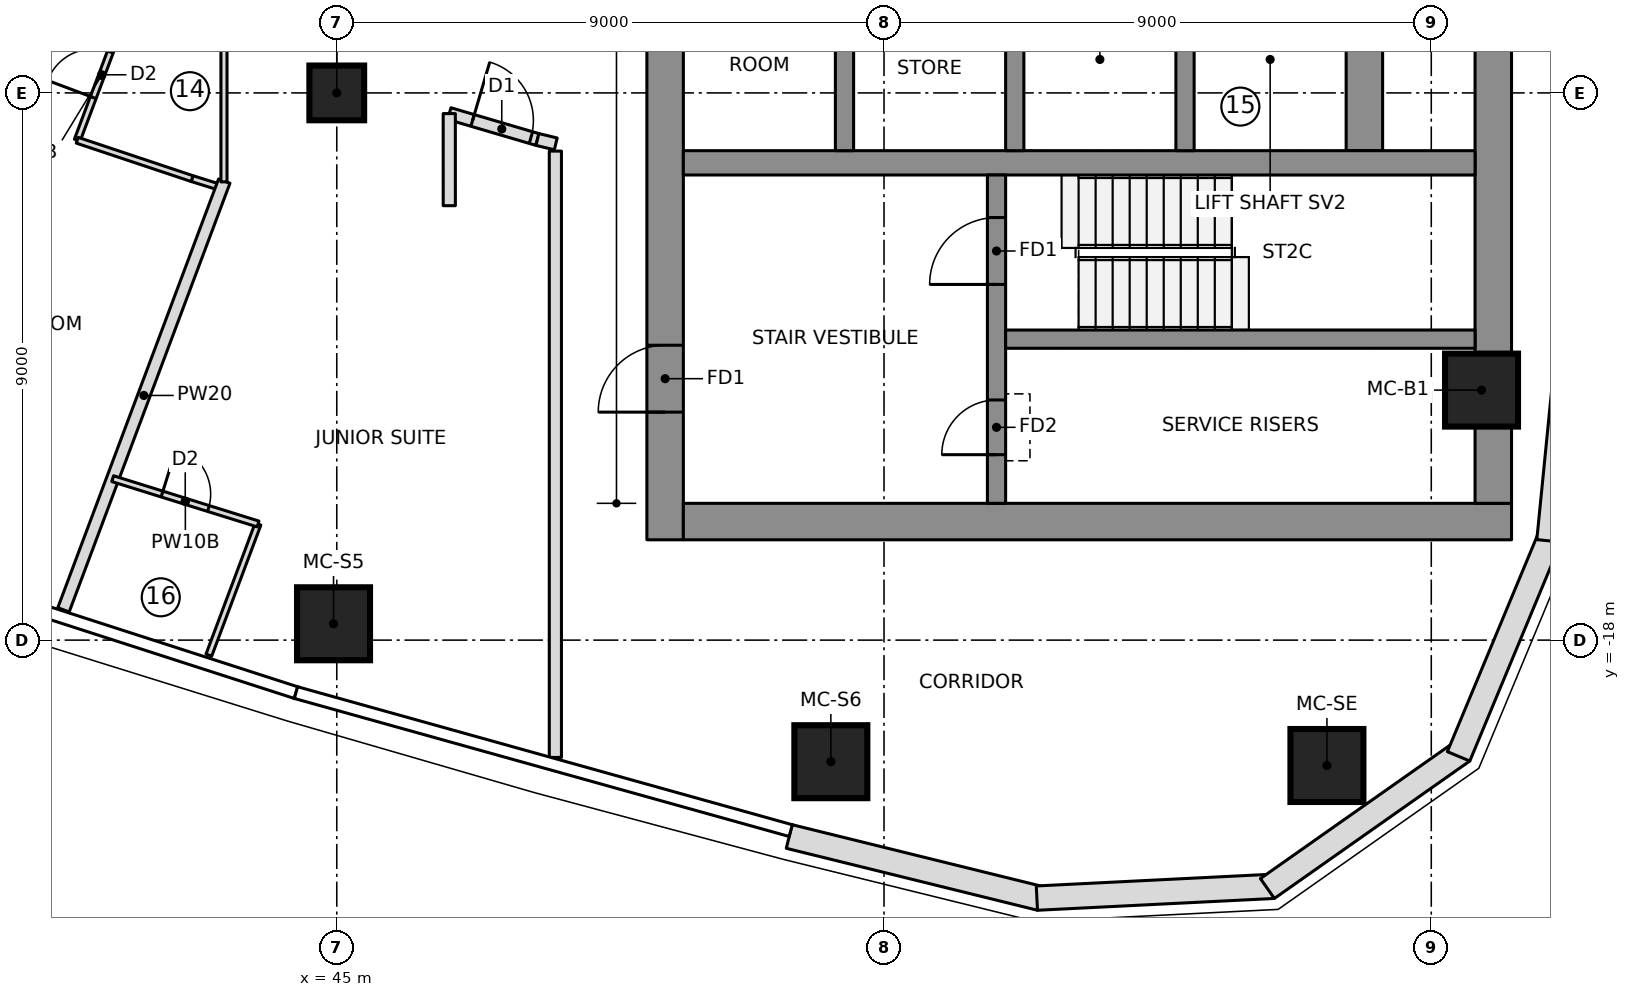
"""IFC4 building model, lengths in metres.
Left out: names, types, materials, properties, quantities, classifications, styles, units other than length and angle.
Written with IfcOpenShell. Run it as: python <this file> out.ifc"""

import sys

from ifc_helpers import new_model, si_unit, direction, frame, frame_2d, origin, origin_2d, place, context, subcontext, project, spatial, polyline, rectangle, outline, extrude, element, fill, save


model = new_model("IFC4")
c1 = context("Model", 3, precision=1e-05, world=origin(), true_north=direction((0.0, 1.0)))
c2 = subcontext(c1, "Body", "Model", "MODEL_VIEW")
j1 = project(units=[si_unit("LENGTHUNIT", "METRE"), si_unit("PLANEANGLEUNIT", "RADIAN")], contexts=[c1])
p1 = place(None, origin())
s1 = spatial("IfcSite", under=j1, at=p1, CompositionType="ELEMENT")
p2 = place(p1, origin())
s2 = spatial("IfcBuilding", under=s1, at=p2, CompositionType="ELEMENT")
p3 = place(p2, frame((0.0, 0.0, 220.8)))
s3 = spatial("IfcBuildingStorey", under=s2, at=p3, CompositionType="ELEMENT", Elevation=220.8)
p4 = place(p3, frame((50.4, -16.35, 0.0), z_axis=(0.0, 0.0, 1.0), x_axis=(0.0, 1.0, 0.0)))
e1 = element("IfcWall", 1, at=p4, inside=s3, PredefinedType="SHEAR", context=c2, shape_type="SweptSolid", body=[
    extrude(rectangle(XDim=9.7, YDim=0.6, at=frame_2d((4.85, 0.0))), origin(), (0.0, 0.0, 1.0), 3.55),
])
p5 = place(p4, frame((2.1, 0.0, 0.0)))
e2 = element("IfcOpeningElement", 2, at=p5, cuts=e1, PredefinedType="OPENING", context=c2, shape_type="SweptSolid", body=[
    extrude(rectangle(XDim=1.1, YDim=2.1, at=frame_2d((0.55, 1.05))), frame((0.0, 0.31, 0.0), z_axis=(0.0, -1.0, 0.0), x_axis=(1.0, 0.0, 0.0)), (0.0, 0.0, 1.0), 0.62),
])
p6 = place(p3, frame((50.7, -16.05, 0.0), z_axis=(0.0, 0.0, 1.0), x_axis=(1.0, 0.0, 0.0)))
e3 = element("IfcWall", 3, at=p6, inside=s3, PredefinedType="SHEAR", context=c2, shape_type="SweptSolid", body=[
    extrude(rectangle(XDim=13.62, YDim=0.6, at=frame_2d((6.81, 0.0))), origin(), (0.0, 0.0, 1.0), 3.55),
])
p7 = place(p3, frame((64.02, -15.75, 0.0), z_axis=(0.0, 0.0, 1.0), x_axis=(0.0, 1.0, 0.0)))
e4 = element("IfcWall", 4, at=p7, inside=s3, PredefinedType="SHEAR", context=c2, shape_type="SweptSolid", body=[
    extrude(rectangle(XDim=8.248, YDim=0.6, at=frame_2d((4.124, 0.0))), origin(), (0.0, 0.0, 1.0), 3.55),
])
p8 = place(p3, frame((61.9, -9.95, 0.0), z_axis=(0.0, 0.0, 1.0), x_axis=(0.0, 1.0, 0.0)))
e5 = element("IfcWall", 5, at=p8, inside=s3, PredefinedType="SHEAR", context=c2, shape_type="SweptSolid", body=[
    extrude(rectangle(XDim=19.9, YDim=0.6, at=frame_2d((9.95, 0.0))), origin(), (0.0, 0.0, 1.0), 3.55),
])
p9 = place(p3, frame((50.7, -10.15, 0.0), z_axis=(0.0, 0.0, 1.0), x_axis=(1.0, 0.0, 0.0)))
e6 = element("IfcWall", 6, at=p9, inside=s3, PredefinedType="SHEAR", context=c2, shape_type="SweptSolid", body=[
    extrude(rectangle(XDim=13.02, YDim=0.4, at=frame_2d((6.51, 0.0))), origin(), (0.0, 0.0, 1.0), 3.55),
])
for number, where, z_axis, x_axis in (
    (7, (53.35, -9.95, 0.0), (0.0, 0.0, 1.0), (0.0, 1.0, 0.0)),
    (8, (56.15, -9.95, 0.0), (0.0, 0.0, 1.0), (0.0, 1.0, 0.0)),
    (9, (58.95, -9.95, 0.0), (0.0, 0.0, 1.0), (0.0, 1.0, 0.0)),
):
    element("IfcWall", number, at=place(p3, frame(where, z_axis=z_axis, x_axis=x_axis)), inside=s3, PredefinedType="SHEAR", context=c2, shape_type="SweptSolid", body=[
        extrude(rectangle(XDim=3.0, YDim=0.3, at=frame_2d((1.5, 0.0))), origin(), (0.0, 0.0, 1.0), 3.55),
    ])
p10 = place(p3, frame((55.85, -15.75, 0.0), z_axis=(0.0, 0.0, 1.0), x_axis=(0.0, 1.0, 0.0)))
e10 = element("IfcWall", 10, at=p10, inside=s3, PredefinedType="SHEAR", context=c2, shape_type="SweptSolid", body=[
    extrude(rectangle(XDim=5.4, YDim=0.3, at=frame_2d((2.7, 0.0))), origin(), (0.0, 0.0, 1.0), 3.55),
])
p11 = place(p10, frame((3.6, 0.0, 0.0)))
e11 = element("IfcOpeningElement", 11, at=p11, cuts=e10, PredefinedType="OPENING", context=c2, shape_type="SweptSolid", body=[
    extrude(rectangle(XDim=1.1, YDim=2.1, at=frame_2d((0.55, 1.05))), frame((0.0, 0.16, 0.0), z_axis=(0.0, -1.0, 0.0), x_axis=(1.0, 0.0, 0.0)), (0.0, 0.0, 1.0), 0.32),
])
p12 = place(p10, frame((0.8, 0.0, 0.0)))
e12 = element("IfcOpeningElement", 12, at=p12, cuts=e10, PredefinedType="OPENING", context=c2, shape_type="SweptSolid", body=[
    extrude(rectangle(XDim=0.9, YDim=2.1, at=frame_2d((0.45, 1.05))), frame((0.0, 0.16, 0.0), z_axis=(0.0, -1.0, 0.0), x_axis=(1.0, 0.0, 0.0)), (0.0, 0.0, 1.0), 0.32),
])
p13 = place(p3, frame((56.0, -13.05, 0.0), z_axis=(0.0, 0.0, 1.0), x_axis=(1.0, 0.0, 0.0)))
e13 = element("IfcWall", 13, at=p13, inside=s3, PredefinedType="SHEAR", context=c2, shape_type="SweptSolid", body=[
    extrude(rectangle(XDim=7.72, YDim=0.3, at=frame_2d((3.86, 0.0))), origin(), (0.0, 0.0, 1.0), 3.55),
])
for number, where, z_axis, x_axis in (
    (14, (44.947, -17.731, 0.0), (0.0, 0.0, 1.0), (1.0, 0.0, 0.0)),
    (15, (53.125, -20.0, 0.0), (0.0, 0.0, 1.0), (1.0, 0.0, 0.0)),
    (16, (61.284, -20.062, 0.0), (0.0, 0.0, 1.0), (1.0, 0.0, 0.0)),
    (17, (63.826, -13.888, 0.0), (0.0, 0.0, 1.0), (1.0, 0.0, 0.0)),
):
    element("IfcColumn", number, at=place(p3, frame(where, z_axis=z_axis, x_axis=x_axis)), inside=s3, PredefinedType="COLUMN", context=c2, shape_type="SweptSolid", body=[
        extrude(rectangle(XDim=1.2, YDim=1.2, at=origin_2d()), origin(), (0.0, 0.0, 1.0), 3.55),
    ])
p14 = place(p3, frame((45.0, -9.0, 0.0), z_axis=(0.0, 0.0, 1.0), x_axis=(1.0, 0.0, 0.0)))
e18 = element("IfcColumn", 18, at=p14, inside=s3, PredefinedType="COLUMN", context=c2, shape_type="SweptSolid", body=[
    extrude(rectangle(XDim=0.9, YDim=0.9, at=origin_2d()), origin(), (0.0, 0.0, 1.0), 3.55),
])
p15 = place(p3, frame((52.441, -21.23, 0.0), z_axis=(0.0, 0.0, 1.0), x_axis=(0.970902342456, -0.23947576373, 0.0)))
e19 = element("IfcWall", 19, at=p15, inside=s3, PredefinedType="NOTDEFINED", context=c2, shape_type="SweptSolid", body=[
    extrude(outline(polyline([(0.0, -0.2), (4.255, -0.2), (4.197, 0.2), (0.0, 0.2), (0.0, -0.2)])), origin(), (0.0, 0.0, 1.0), 3.25),
])
p16 = place(p3, frame((56.543, -22.242, 0.0), z_axis=(0.0, 0.0, 1.0), x_axis=(0.998758875872, 0.049806705046, 0.0)))
e20 = element("IfcWall", 20, at=p16, inside=s3, PredefinedType="NOTDEFINED", context=c2, shape_type="SweptSolid", body=[
    extrude(outline(polyline([(-0.029, -0.2), (3.871, -0.2), (3.756, 0.2), (0.029, 0.2), (-0.029, -0.2)])), origin(), (0.0, 0.0, 1.0), 3.25),
])
p17 = place(p3, frame((60.352, -22.052, 0.0), z_axis=(0.0, 0.0, 1.0), x_axis=(0.817942545532, 0.575299915009, 0.0)))
e21 = element("IfcWall", 21, at=p17, inside=s3, PredefinedType="NOTDEFINED", context=c2, shape_type="SweptSolid", body=[
    extrude(outline(polyline([(-0.058, -0.2), (3.871, -0.2), (3.756, 0.2), (0.058, 0.2), (-0.058, -0.2)])), origin(), (0.0, 0.0, 1.0), 3.25),
])
p18 = place(p3, frame((63.471, -19.858, 0.0), z_axis=(0.0, 0.0, 1.0), x_axis=(0.3844335483, 0.923152667191, 0.0)))
e22 = element("IfcWall", 22, at=p18, inside=s3, PredefinedType="NOTDEFINED", context=c2, shape_type="SweptSolid", body=[
    extrude(outline(polyline([(-0.058, -0.2), (3.843, -0.2), (3.784, 0.2), (0.058, 0.2), (-0.058, -0.2)])), origin(), (0.0, 0.0, 1.0), 3.25),
])
p19 = place(p3, frame((64.938, -16.337, 0.0), z_axis=(0.0, 0.0, 1.0), x_axis=(0.098718218066, 0.995115427185, 0.0)))
e23 = element("IfcWall", 23, at=p19, inside=s3, PredefinedType="NOTDEFINED", context=c2, shape_type="SweptSolid", body=[
    extrude(outline(polyline([(-0.03, -0.2), (4.096, -0.2), (4.09, 0.2), (0.03, 0.2), (-0.03, -0.2)])), origin(), (0.0, 0.0, 1.0), 3.25),
])
p20 = place(p3, frame((40.732, -9.779, 0.0), z_axis=(0.0, 0.0, 1.0), x_axis=(0.351146927505, 0.936320370014, 0.0)))
e24 = element("IfcWall", 24, at=p20, inside=s3, PredefinedType="PARTITIONING", context=c2, shape_type="SweptSolid", body=[
    extrude(rectangle(XDim=2.278, YDim=0.1, at=frame_2d((1.139, 0.0))), origin(), (0.0, 0.0, 1.0), 3.25),
])
p21 = place(p20, frame((0.75, 0.0, 0.0)))
e25 = element("IfcOpeningElement", 25, at=p21, cuts=e24, PredefinedType="OPENING", context=c2, shape_type="SweptSolid", body=[
    extrude(rectangle(XDim=0.8, YDim=2.1, at=frame_2d((0.4, 1.05))), frame((0.0, 0.06, 0.0), z_axis=(0.0, -1.0, 0.0), x_axis=(1.0, 0.0, 0.0)), (0.0, 0.0, 1.0), 0.12),
])
p22 = place(p3, frame((43.108, -10.562, 0.0), z_axis=(0.0, 0.0, 1.0), x_axis=(-0.954624465478, 0.297812239356, 0.0)))
e26 = element("IfcWall", 26, at=p22, inside=s3, PredefinedType="PARTITIONING", context=c2, shape_type="SweptSolid", body=[
    extrude(rectangle(XDim=0.511, YDim=0.1, at=frame_2d((0.255, 0.0))), origin(), (0.0, 0.0, 1.0), 3.25),
])
p23 = place(p3, frame((42.621, -10.409, 0.0), z_axis=(0.0, 0.0, 1.0), x_axis=(-0.948499248693, 0.316779379426, 0.0)))
e27 = element("IfcWall", 27, at=p23, inside=s3, PredefinedType="PARTITIONING", context=c2, shape_type="SweptSolid", body=[
    extrude(rectangle(XDim=1.991, YDim=0.1, at=frame_2d((0.996, 0.0))), origin(), (0.0, 0.0, 1.0), 3.25),
])
p24 = place(p3, frame((40.506, -17.501, 0.0), z_axis=(0.0, 0.0, 1.0), x_axis=(0.351119888923, 0.936330509811, 0.0)))
e28 = element("IfcWall", 28, at=p24, inside=s3, PredefinedType="PARTITIONING", context=c2, shape_type="SweptSolid", body=[
    extrude(rectangle(XDim=7.531, YDim=0.2, at=frame_2d((3.766, 0.0))), origin(), (0.0, 0.0, 1.0), 3.25),
])
p25 = place(p3, frame((43.705, -16.09, 0.0), z_axis=(0.0, 0.0, 1.0), x_axis=(-0.351111827312, -0.936333532841, 0.0)))
e29 = element("IfcWall", 29, at=p25, inside=s3, PredefinedType="PARTITIONING", context=c2, shape_type="SweptSolid", body=[
    extrude(rectangle(XDim=2.304, YDim=0.1, at=frame_2d((1.152, 0.0))), origin(), (0.0, 0.0, 1.0), 3.25),
])
p26 = place(p3, frame((41.315, -15.344, 0.0), z_axis=(0.0, 0.0, 1.0), x_axis=(0.954665433195, -0.297680887299, 0.0)))
e30 = element("IfcWall", 30, at=p26, inside=s3, PredefinedType="PARTITIONING", context=c2, shape_type="SweptSolid", body=[
    extrude(rectangle(XDim=2.504, YDim=0.1, at=frame_2d((1.252, 0.0))), origin(), (0.0, 0.0, 1.0), 3.25),
])
p27 = place(p26, frame((0.85, 0.0, 0.0)))
e31 = element("IfcOpeningElement", 31, at=p27, cuts=e30, PredefinedType="OPENING", context=c2, shape_type="SweptSolid", body=[
    extrude(rectangle(XDim=0.8, YDim=2.1, at=frame_2d((0.4, 1.05))), frame((0.0, 0.06, 0.0), z_axis=(0.0, -1.0, 0.0), x_axis=(1.0, 0.0, 0.0)), (0.0, 0.0, 1.0), 0.12),
])
p28 = place(p3, frame((43.145, -8.165, 0.0), z_axis=(0.0, 0.0, 1.0), x_axis=(0.0, -1.0, 0.0)))
e32 = element("IfcWall", 32, at=p28, inside=s3, PredefinedType="PARTITIONING", context=c2, shape_type="SweptSolid", body=[
    extrude(rectangle(XDim=2.298, YDim=0.1, at=frame_2d((1.149, 0.0))), origin(), (0.0, 0.0, 1.0), 3.25),
])
p29 = place(p3, frame((46.85, -9.34, 0.0), z_axis=(0.0, 0.0, 1.0), x_axis=(0.95944263903, -0.281903924079, 0.0)))
e33 = element("IfcWall", 33, at=p29, inside=s3, PredefinedType="PARTITIONING", context=c2, shape_type="SweptSolid", body=[
    extrude(rectangle(XDim=1.511, YDim=0.2, at=frame_2d((0.756, 0.0))), origin(), (0.0, 0.0, 1.0), 3.25),
])
p30 = place(p29, frame((0.4, 0.0, 0.0)))
e34 = element("IfcOpeningElement", 34, at=p30, cuts=e33, PredefinedType="OPENING", context=c2, shape_type="SweptSolid", body=[
    extrude(rectangle(XDim=1.0, YDim=2.1, at=frame_2d((0.5, 1.05))), frame((0.0, 0.11, 0.0), z_axis=(0.0, -1.0, 0.0), x_axis=(1.0, 0.0, 0.0)), (0.0, 0.0, 1.0), 0.22),
])
p31 = place(p3, frame((46.851, -10.855, 0.0), z_axis=(0.0, 0.0, 1.0), x_axis=(-0.000322320692, 0.999999948055, 0.0)))
e35 = element("IfcWall", 35, at=p31, inside=s3, PredefinedType="PARTITIONING", context=c2, shape_type="SweptSolid", body=[
    extrude(rectangle(XDim=1.515, YDim=0.2, at=frame_2d((0.757, 0.0))), origin(), (0.0, 0.0, 1.0), 3.25),
])
p32 = place(p3, frame((48.3, -9.766, 0.0), z_axis=(0.0, 0.0, 1.0), x_axis=(0.972415906571, -0.233253734477, 0.0)))
e36 = element("IfcWall", 36, at=p32, inside=s3, PredefinedType="PARTITIONING", context=c2, shape_type="SweptSolid", body=[
    extrude(rectangle(XDim=0.31, YDim=0.2, at=frame_2d((0.155, 0.0))), origin(), (0.0, 0.0, 1.0), 3.25),
])
p33 = place(p3, frame((48.595, -9.957, 0.0), z_axis=(0.0, 0.0, 1.0), x_axis=(0.0, -1.0, 0.0)))
e37 = element("IfcWall", 37, at=p33, inside=s3, PredefinedType="PARTITIONING", context=c2, shape_type="SweptSolid", body=[
    extrude(rectangle(XDim=9.972, YDim=0.2, at=frame_2d((4.986, 0.0))), origin(), (0.0, 0.0, 1.0), 3.25),
])
p34 = place(p21, origin())
e38 = element("IfcDoor", 38, at=p34, inside=s3, OperationType="SINGLE_SWING_LEFT", PredefinedType="DOOR", context=c2, shape_type="SweptSolid", body=[
    extrude(rectangle(XDim=0.8, YDim=2.1, at=frame_2d((0.4, 1.05))), frame((0.0, 0.025, 0.0), z_axis=(0.0, -1.0, 0.0), x_axis=(1.0, 0.0, 0.0)), (0.0, 0.0, 1.0), 0.05),
])
fill(e25, e38)
p35 = place(p27, origin())
e39 = element("IfcDoor", 39, at=p35, inside=s3, OperationType="SINGLE_SWING_LEFT", PredefinedType="DOOR", context=c2, shape_type="SweptSolid", body=[
    extrude(rectangle(XDim=0.8, YDim=2.1, at=frame_2d((0.4, 1.05))), frame((0.0, 0.025, 0.0), z_axis=(0.0, -1.0, 0.0), x_axis=(1.0, 0.0, 0.0)), (0.0, 0.0, 1.0), 0.05),
])
fill(e31, e39)
p36 = place(p30, origin())
e40 = element("IfcDoor", 40, at=p36, inside=s3, OperationType="SINGLE_SWING_LEFT", PredefinedType="DOOR", context=c2, shape_type="SweptSolid", body=[
    extrude(rectangle(XDim=1.0, YDim=2.1, at=frame_2d((0.5, 1.05))), frame((0.0, 0.025, 0.0), z_axis=(0.0, -1.0, 0.0), x_axis=(1.0, 0.0, 0.0)), (0.0, 0.0, 1.0), 0.05),
])
fill(e34, e40)
p37 = place(p11, origin())
e41 = element("IfcDoor", 41, at=p37, inside=s3, OperationType="SINGLE_SWING_RIGHT", PredefinedType="DOOR", context=c2, shape_type="SweptSolid", body=[
    extrude(rectangle(XDim=1.1, YDim=2.1, at=frame_2d((0.55, 1.05))), frame((0.0, 0.025, 0.0), z_axis=(0.0, -1.0, 0.0), x_axis=(1.0, 0.0, 0.0)), (0.0, 0.0, 1.0), 0.05),
])
fill(e11, e41)
p38 = place(p5, origin())
e42 = element("IfcDoor", 42, at=p38, inside=s3, OperationType="SINGLE_SWING_RIGHT", PredefinedType="DOOR", context=c2, shape_type="SweptSolid", body=[
    extrude(rectangle(XDim=1.1, YDim=2.1, at=frame_2d((0.55, 1.05))), frame((0.0, 0.025, 0.0), z_axis=(0.0, -1.0, 0.0), x_axis=(1.0, 0.0, 0.0)), (0.0, 0.0, 1.0), 0.05),
])
fill(e2, e42)
p39 = place(p12, origin())
e43 = element("IfcDoor", 43, at=p39, inside=s3, OperationType="SINGLE_SWING_LEFT", PredefinedType="DOOR", context=c2, shape_type="SweptSolid", body=[
    extrude(rectangle(XDim=0.9, YDim=2.1, at=frame_2d((0.45, 1.05))), frame((0.0, 0.025, 0.0), z_axis=(0.0, -1.0, 0.0), x_axis=(1.0, 0.0, 0.0)), (0.0, 0.0, 1.0), 0.05),
])
fill(e12, e43)
save(model, sys.argv[1])
